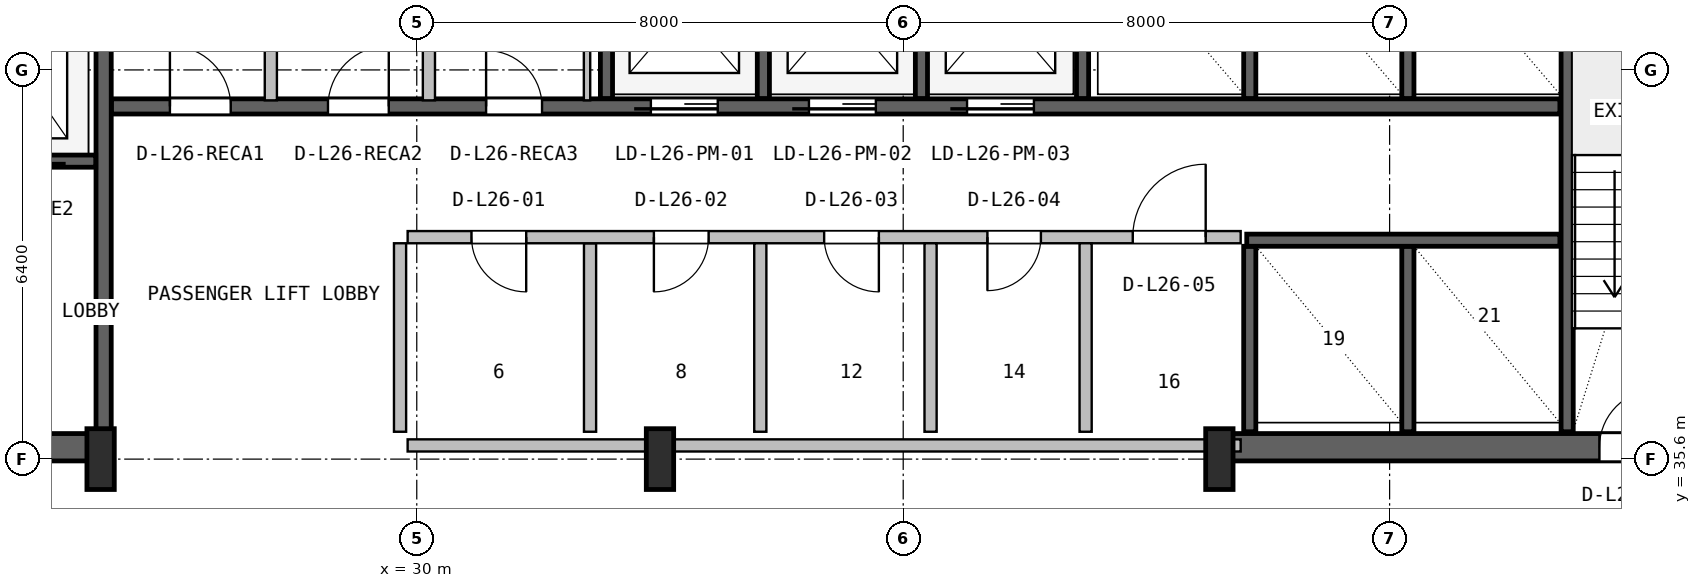
"""IFC4 building model, lengths in metres.
Left out: names, types, materials, properties, quantities, classifications, styles, units other than length and angle.
Written with IfcOpenShell. Run it as: python <this file> out.ifc"""

import sys

from ifc_helpers import new_model, si_unit, direction, frame, frame_2d, origin, origin_2d, place, context, subcontext, project, spatial, rectangle, i_section, extrude, source, transform, mapped, element, fill, save


model = new_model("IFC4")
c1 = context("Model", 3, precision=1e-05, world=origin(), true_north=direction((0.0, 1.0)))
c2 = subcontext(c1, "Body", "Model", "MODEL_VIEW")
j1 = project(units=[si_unit("LENGTHUNIT", "METRE"), si_unit("PLANEANGLEUNIT", "RADIAN")], contexts=[c1])
p1 = place(None, origin())
s1 = spatial("IfcSite", under=j1, at=p1, CompositionType="ELEMENT")
p2 = place(p1, origin())
s2 = spatial("IfcBuilding", under=s1, at=p2, CompositionType="ELEMENT")
p3 = place(p2, frame((0.0, 0.0, 110.6)))
s3 = spatial("IfcBuildingStorey", under=s2, at=p3, CompositionType="ELEMENT", Elevation=110.6)
p4 = place(p3, frame((15.57, 35.795, 0.0), z_axis=(0.0, 0.0, 1.0), x_axis=(1.0, 0.0, 0.0)))
e1 = element("IfcWall", 1, at=p4, inside=s3, PredefinedType="SHEAR", context=c2, shape_type="SweptSolid", body=[
    extrude(rectangle(XDim=9.23, YDim=0.45, at=frame_2d((4.615, 0.0))), origin(), (0.0, 0.0, 1.0), 3.55),
])
p5 = place(p4, frame((5.4, 0.0, 0.0)))
e2 = element("IfcOpeningElement", 2, at=p5, cuts=e1, PredefinedType="OPENING", context=c2, shape_type="SweptSolid", body=[
    extrude(rectangle(XDim=1.0, YDim=2.1, at=frame_2d((0.5, 1.05))), frame((0.0, 0.235, 0.0), z_axis=(0.0, -1.0, 0.0), x_axis=(1.0, 0.0, 0.0)), (0.0, 0.0, 1.0), 0.47),
])
p6 = place(p3, frame((43.2, 35.795, 0.0), z_axis=(0.0, 0.0, 1.0), x_axis=(1.0, 0.0, 0.0)))
e3 = element("IfcWall", 3, at=p6, inside=s3, PredefinedType="SHEAR", context=c2, shape_type="SweptSolid", body=[
    extrude(rectangle(XDim=9.23, YDim=0.45, at=frame_2d((4.615, 0.0))), origin(), (0.0, 0.0, 1.0), 3.55),
])
p7 = place(p6, frame((6.25, 0.0, 0.0)))
e4 = element("IfcOpeningElement", 4, at=p7, cuts=e3, PredefinedType="OPENING", context=c2, shape_type="SweptSolid", body=[
    extrude(rectangle(XDim=0.95, YDim=2.1, at=frame_2d((0.475, 1.05))), frame((0.0, 0.235, 0.0), z_axis=(0.0, -1.0, 0.0), x_axis=(1.0, 0.0, 0.0)), (0.0, 0.0, 1.0), 0.47),
])
m1 = source(origin(), c2, "Body", "SweptSolid", [
    extrude(i_section(OverallWidth=0.45, OverallDepth=1.0, WebThickness=0.016, FlangeThickness=0.03, FilletRadius=0.016, at=origin_2d()), origin(), (0.0, 0.0, 1.0), 3.8),
])
for number, where, z_axis, x_axis in (
    (5, (24.8, 35.6, 0.0), (0.0, 0.0, 1.0), (1.0, 0.0, 0.0)),
    (6, (34.0, 35.6, 0.0), (0.0, 0.0, 1.0), (1.0, 0.0, 0.0)),
    (7, (43.2, 35.6, 0.0), (0.0, 0.0, 1.0), (1.0, 0.0, 0.0)),
):
    element("IfcColumn", number, at=place(p3, frame(where, z_axis=z_axis, x_axis=x_axis)), inside=s3, PredefinedType="COLUMN", context=c2, shape_type="MappedRepresentation", body=[
        mapped(m1, transform((0.0, 0.0, 0.0), x_axis=(1.0, 0.0, 0.0), y_axis=(0.0, 1.0, 0.0), z_axis=(0.0, 0.0, 1.0), scale=1.0)),
    ])
p8 = place(p3, frame((24.85, 36.05, 0.0), z_axis=(0.0, 0.0, 1.0), x_axis=(0.0, 1.0, 0.0)))
e8 = element("IfcWall", 8, at=p8, inside=s3, PredefinedType="SHEAR", context=c2, shape_type="SweptSolid", body=[
    extrude(rectangle(XDim=10.45, YDim=0.25, at=frame_2d((5.225, 0.0))), origin(), (0.0, 0.0, 1.0), 3.55),
])
p9 = place(p3, frame((19.2, 40.5, 0.0), z_axis=(0.0, 0.0, 1.0), x_axis=(1.0, 0.0, 0.0)))
e9 = element("IfcWall", 9, at=p9, inside=s3, PredefinedType="SHEAR", context=c2, shape_type="SweptSolid", body=[
    extrude(rectangle(XDim=5.52, YDim=0.2, at=frame_2d((2.76, 0.0))), origin(), (0.0, 0.0, 1.0), 3.55),
])
p10 = place(p9, frame((1.05, 0.0, 0.0)))
e10 = element("IfcOpeningElement", 10, at=p10, cuts=e9, PredefinedType="OPENING", context=c2, shape_type="SweptSolid", body=[
    extrude(rectangle(XDim=1.1, YDim=2.18, at=frame_2d((0.55, 1.09))), frame((0.0, 0.11, 0.0), z_axis=(0.0, -1.0, 0.0), x_axis=(1.0, 0.0, 0.0)), (0.0, 0.0, 1.0), 0.22),
])
p11 = place(p9, frame((3.65, 0.0, 0.0)))
e11 = element("IfcOpeningElement", 11, at=p11, cuts=e9, PredefinedType="OPENING", context=c2, shape_type="SweptSolid", body=[
    extrude(rectangle(XDim=1.1, YDim=2.18, at=frame_2d((0.55, 1.09))), frame((0.0, 0.11, 0.0), z_axis=(0.0, -1.0, 0.0), x_axis=(1.0, 0.0, 0.0)), (0.0, 0.0, 1.0), 0.22),
])
p12 = place(p3, frame((48.92, 36.05, 0.0), z_axis=(0.0, 0.0, 1.0), x_axis=(0.0, 1.0, 0.0)))
e12 = element("IfcWall", 12, at=p12, inside=s3, PredefinedType="SHEAR", context=c2, shape_type="SweptSolid", body=[
    extrude(rectangle(XDim=10.5, YDim=0.2, at=frame_2d((5.25, 0.0))), origin(), (0.0, 0.0, 1.0), 3.55),
])
p13 = place(p3, frame((24.98, 41.4, 0.0), z_axis=(0.0, 0.0, 1.0), x_axis=(1.0, 0.0, 0.0)))
e13 = element("IfcWall", 13, at=p13, inside=s3, PredefinedType="SHEAR", context=c2, shape_type="SweptSolid", body=[
    extrude(rectangle(XDim=23.82, YDim=0.25, at=frame_2d((11.91, 0.0))), origin(), (0.0, 0.0, 1.0), 3.55),
])
p14 = place(p13, frame((8.87, 0.0, 0.0)))
e14 = element("IfcOpeningElement", 14, at=p14, cuts=e13, PredefinedType="OPENING", context=c2, shape_type="SweptSolid", body=[
    extrude(rectangle(XDim=1.1, YDim=2.18, at=frame_2d((0.55, 1.09))), frame((0.0, 0.135, 0.0), z_axis=(0.0, -1.0, 0.0), x_axis=(1.0, 0.0, 0.0)), (0.0, 0.0, 1.0), 0.27),
])
p15 = place(p13, frame((11.47, 0.0, 0.0)))
e15 = element("IfcOpeningElement", 15, at=p15, cuts=e13, PredefinedType="OPENING", context=c2, shape_type="SweptSolid", body=[
    extrude(rectangle(XDim=1.1, YDim=2.18, at=frame_2d((0.55, 1.09))), frame((0.0, 0.135, 0.0), z_axis=(0.0, -1.0, 0.0), x_axis=(1.0, 0.0, 0.0)), (0.0, 0.0, 1.0), 0.27),
])
p16 = place(p13, frame((14.07, 0.0, 0.0)))
e16 = element("IfcOpeningElement", 16, at=p16, cuts=e13, PredefinedType="OPENING", context=c2, shape_type="SweptSolid", body=[
    extrude(rectangle(XDim=1.1, YDim=2.18, at=frame_2d((0.55, 1.09))), frame((0.0, 0.135, 0.0), z_axis=(0.0, -1.0, 0.0), x_axis=(1.0, 0.0, 0.0)), (0.0, 0.0, 1.0), 0.27),
])
p17 = place(p13, frame((0.96, 0.0, 0.0)))
e17 = element("IfcOpeningElement", 17, at=p17, cuts=e13, PredefinedType="OPENING", context=c2, shape_type="SweptSolid", body=[
    extrude(rectangle(XDim=1.0, YDim=2.08, at=frame_2d((0.5, 1.04))), frame((0.0, 0.135, 0.0), z_axis=(0.0, -1.0, 0.0), x_axis=(1.0, 0.0, 0.0)), (0.0, 0.0, 1.0), 0.27),
])
p18 = place(p13, frame((3.56, 0.0, 0.0)))
e18 = element("IfcOpeningElement", 18, at=p18, cuts=e13, PredefinedType="OPENING", context=c2, shape_type="SweptSolid", body=[
    extrude(rectangle(XDim=1.0, YDim=2.08, at=frame_2d((0.5, 1.04))), frame((0.0, 0.135, 0.0), z_axis=(0.0, -1.0, 0.0), x_axis=(1.0, 0.0, 0.0)), (0.0, 0.0, 1.0), 0.27),
])
p19 = place(p13, frame((6.16, 0.0, 0.0)))
e19 = element("IfcOpeningElement", 19, at=p19, cuts=e13, PredefinedType="OPENING", context=c2, shape_type="SweptSolid", body=[
    extrude(rectangle(XDim=0.92, YDim=2.08, at=frame_2d((0.46, 1.04))), frame((0.0, 0.135, 0.0), z_axis=(0.0, -1.0, 0.0), x_axis=(1.0, 0.0, 0.0)), (0.0, 0.0, 1.0), 0.27),
])
p20 = place(p3, frame((33.12, 41.53, 0.0), z_axis=(0.0, 0.0, 1.0), x_axis=(0.0, 1.0, 0.0)))
e20 = element("IfcWall", 20, at=p20, inside=s3, PredefinedType="SHEAR", context=c2, shape_type="SweptSolid", body=[
    extrude(rectangle(XDim=5.02, YDim=0.2, at=frame_2d((2.51, 0.0))), origin(), (0.0, 0.0, 1.0), 3.55),
])
for number, where, z_axis, x_axis in (
    (21, (35.7, 41.53, 0.0), (0.0, 0.0, 1.0), (0.0, 1.0, 0.0)),
    (22, (38.3, 41.53, 0.0), (0.0, 0.0, 1.0), (0.0, 1.0, 0.0)),
):
    element("IfcWall", number, at=place(p3, frame(where, z_axis=z_axis, x_axis=x_axis)), inside=s3, PredefinedType="SHEAR", context=c2, shape_type="SweptSolid", body=[
        extrude(rectangle(XDim=2.87, YDim=0.2, at=frame_2d((1.435, 0.0))), origin(), (0.0, 0.0, 1.0), 3.55),
    ])
p21 = place(p3, frame((40.95, 41.53, 0.0), z_axis=(0.0, 0.0, 1.0), x_axis=(0.0, 1.0, 0.0)))
e23 = element("IfcWall", 23, at=p21, inside=s3, PredefinedType="SHEAR", context=c2, shape_type="SweptSolid", body=[
    extrude(rectangle(XDim=5.02, YDim=0.2, at=frame_2d((2.51, 0.0))), origin(), (0.0, 0.0, 1.0), 3.55),
])
for number, where, z_axis, x_axis in (
    (24, (43.7, 41.53, 0.0), (0.0, 0.0, 1.0), (0.0, 1.0, 0.0)),
    (25, (46.3, 41.53, 0.0), (0.0, 0.0, 1.0), (0.0, 1.0, 0.0)),
):
    element("IfcWall", number, at=place(p3, frame(where, z_axis=z_axis, x_axis=x_axis)), inside=s3, PredefinedType="SHEAR", context=c2, shape_type="SweptSolid", body=[
        extrude(rectangle(XDim=2.87, YDim=0.2, at=frame_2d((1.435, 0.0))), origin(), (0.0, 0.0, 1.0), 3.55),
    ])
for number, where, z_axis, x_axis in (
    (26, (43.7, 36.05, 0.0), (0.0, 0.0, 1.0), (0.0, 1.0, 0.0)),
    (27, (46.3, 36.05, 0.0), (0.0, 0.0, 1.0), (0.0, 1.0, 0.0)),
):
    element("IfcWall", number, at=place(p3, frame(where, z_axis=z_axis, x_axis=x_axis)), inside=s3, PredefinedType="SHEAR", context=c2, shape_type="SweptSolid", body=[
        extrude(rectangle(XDim=3.05, YDim=0.2, at=frame_2d((1.525, 0.0))), origin(), (0.0, 0.0, 1.0), 3.55),
    ])
p22 = place(p3, frame((43.65, 39.2, 0.0), z_axis=(0.0, 0.0, 1.0), x_axis=(1.0, 0.0, 0.0)))
e28 = element("IfcWall", 28, at=p22, inside=s3, PredefinedType="SHEAR", context=c2, shape_type="SweptSolid", body=[
    extrude(rectangle(XDim=5.15, YDim=0.2, at=frame_2d((2.575, 0.0))), origin(), (0.0, 0.0, 1.0), 3.55),
])
p23 = place(p3, frame((29.85, 35.825, 0.0), z_axis=(0.0, 0.0, 1.0), x_axis=(1.0, 0.0, 0.0)))
e29 = element("IfcWall", 29, at=p23, inside=s3, PredefinedType="SOLIDWALL", context=c2, shape_type="SweptSolid", body=[
    extrude(rectangle(XDim=13.7, YDim=0.2, at=frame_2d((6.85, 0.0))), origin(), (0.0, 0.0, 1.0), 2.325),
])
p24 = place(p3, frame((32.85, 36.05, 0.0), z_axis=(0.0, 0.0, 1.0), x_axis=(0.0, 1.0, 0.0)))
e30 = element("IfcWall", 30, at=p24, inside=s3, PredefinedType="PLUMBINGWALL", context=c2, shape_type="SweptSolid", body=[
    extrude(rectangle(XDim=3.1, YDim=0.2, at=frame_2d((1.55, 0.0))), origin(), (0.0, 0.0, 1.0), 3.53),
])
p25 = place(p3, frame((29.85, 39.25, 0.0), z_axis=(0.0, 0.0, 1.0), x_axis=(1.0, 0.0, 0.0)))
e31 = element("IfcWall", 31, at=p25, inside=s3, PredefinedType="SOLIDWALL", context=c2, shape_type="SweptSolid", body=[
    extrude(rectangle(XDim=13.7, YDim=0.2, at=frame_2d((6.85, 0.0))), origin(), (0.0, 0.0, 1.0), 3.53),
])
p26 = place(p25, frame((1.05, 0.0, 0.0)))
e32 = element("IfcOpeningElement", 32, at=p26, cuts=e31, PredefinedType="OPENING", context=c2, shape_type="SweptSolid", body=[
    extrude(rectangle(XDim=0.9, YDim=2.06, at=frame_2d((0.45, 1.03))), frame((0.0, 0.11, 0.0), z_axis=(0.0, -1.0, 0.0), x_axis=(1.0, 0.0, 0.0)), (0.0, 0.0, 1.0), 0.22),
])
p27 = place(p25, frame((4.05, 0.0, 0.0)))
e33 = element("IfcOpeningElement", 33, at=p27, cuts=e31, PredefinedType="OPENING", context=c2, shape_type="SweptSolid", body=[
    extrude(rectangle(XDim=0.9, YDim=2.06, at=frame_2d((0.45, 1.03))), frame((0.0, 0.11, 0.0), z_axis=(0.0, -1.0, 0.0), x_axis=(1.0, 0.0, 0.0)), (0.0, 0.0, 1.0), 0.22),
])
p28 = place(p25, frame((6.85, 0.0, 0.0)))
e34 = element("IfcOpeningElement", 34, at=p28, cuts=e31, PredefinedType="OPENING", context=c2, shape_type="SweptSolid", body=[
    extrude(rectangle(XDim=0.9, YDim=2.06, at=frame_2d((0.45, 1.03))), frame((0.0, 0.11, 0.0), z_axis=(0.0, -1.0, 0.0), x_axis=(1.0, 0.0, 0.0)), (0.0, 0.0, 1.0), 0.22),
])
p29 = place(p25, frame((9.535, 0.0, 0.0)))
e35 = element("IfcOpeningElement", 35, at=p29, cuts=e31, PredefinedType="OPENING", context=c2, shape_type="SweptSolid", body=[
    extrude(rectangle(XDim=0.88, YDim=2.06, at=frame_2d((0.44, 1.03))), frame((0.0, 0.11, 0.0), z_axis=(0.0, -1.0, 0.0), x_axis=(1.0, 0.0, 0.0)), (0.0, 0.0, 1.0), 0.22),
])
p30 = place(p25, frame((11.925, 0.0, 0.0)))
e36 = element("IfcOpeningElement", 36, at=p30, cuts=e31, PredefinedType="OPENING", context=c2, shape_type="SweptSolid", body=[
    extrude(rectangle(XDim=1.2, YDim=2.1, at=frame_2d((0.6, 1.05))), frame((0.0, 0.11, 0.0), z_axis=(0.0, -1.0, 0.0), x_axis=(1.0, 0.0, 0.0)), (0.0, 0.0, 1.0), 0.22),
])
for number, where, z_axis, x_axis in (
    (37, (29.725, 36.05, 0.0), (0.0, 0.0, 1.0), (0.0, 1.0, 0.0)),
    (38, (35.65, 36.05, 0.0), (0.0, 0.0, 1.0), (0.0, 1.0, 0.0)),
    (39, (38.45, 36.05, 0.0), (0.0, 0.0, 1.0), (0.0, 1.0, 0.0)),
):
    element("IfcWall", number, at=place(p3, frame(where, z_axis=z_axis, x_axis=x_axis)), inside=s3, PredefinedType="PLUMBINGWALL", context=c2, shape_type="SweptSolid", body=[
        extrude(rectangle(XDim=3.1, YDim=0.2, at=frame_2d((1.55, 0.0))), origin(), (0.0, 0.0, 1.0), 3.53),
    ])
p31 = place(p3, frame((41.0, 36.05, 0.0), z_axis=(0.0, 0.0, 1.0), x_axis=(0.0, 1.0, 0.0)))
e40 = element("IfcWall", 40, at=p31, inside=s3, PredefinedType="SOLIDWALL", context=c2, shape_type="SweptSolid", body=[
    extrude(rectangle(XDim=3.1, YDim=0.2, at=frame_2d((1.55, 0.0))), origin(), (0.0, 0.0, 1.0), 3.53),
])
for number, where, z_axis, x_axis in (
    (41, (27.6, 41.5, 0.0), (0.0, 0.0, 1.0), (0.0, 1.0, 0.0)),
    (42, (30.2, 41.5, 0.0), (0.0, 0.0, 1.0), (0.0, 1.0, 0.0)),
):
    element("IfcWall", number, at=place(p3, frame(where, z_axis=z_axis, x_axis=x_axis)), inside=s3, PredefinedType="SOLIDWALL", context=c2, shape_type="SweptSolid", body=[
        extrude(rectangle(XDim=5.02, YDim=0.2, at=frame_2d((2.51, 0.0))), origin(), (0.0, 0.0, 1.0), 3.53),
    ])
p32 = place(p3, frame((32.8, 41.5, 0.0), z_axis=(0.0, 0.0, 1.0), x_axis=(0.0, 1.0, 0.0)))
e43 = element("IfcWall", 43, at=p32, inside=s3, PredefinedType="PARTITIONING", context=c2, shape_type="SweptSolid", body=[
    extrude(rectangle(XDim=5.02, YDim=0.105, at=frame_2d((2.51, 0.0))), origin(), (0.0, 0.0, 1.0), 3.53),
])
m2 = source(origin(), c2, "Body", "SweptSolid", [
    extrude(rectangle(XDim=0.95, YDim=2.1, at=frame_2d((0.475, 1.05))), frame((0.0, 0.025, 0.0), z_axis=(0.0, -1.0, 0.0), x_axis=(1.0, 0.0, 0.0)), (0.0, 0.0, 1.0), 0.05),
])
p33 = place(p7, origin())
e44 = element("IfcDoor", 44, at=p33, inside=s3, OperationType="SINGLE_SWING_RIGHT", PredefinedType="DOOR", context=c2, shape_type="MappedRepresentation", body=[
    mapped(m2, transform((0.0, 0.0, 0.0), x_axis=(1.0, 0.0, 0.0), y_axis=(0.0, 1.0, 0.0), z_axis=(0.0, 0.0, 1.0), scale=1.0)),
])
fill(e4, e44)
m3 = source(origin(), c2, "Body", "SweptSolid", [
    extrude(rectangle(XDim=1.1, YDim=2.18, at=frame_2d((0.55, 1.09))), frame((0.0, 0.025, 0.0), z_axis=(0.0, -1.0, 0.0), x_axis=(1.0, 0.0, 0.0)), (0.0, 0.0, 1.0), 0.05),
])
p34 = place(p14, frame((1.1, 0.0, 0.0), z_axis=(0.0, 0.0, 1.0), x_axis=(-1.0, 0.0, 0.0)))
e45 = element("IfcDoor", 45, at=p34, inside=s3, OperationType="SLIDING_TO_LEFT", PredefinedType="DOOR", context=c2, shape_type="MappedRepresentation", body=[
    mapped(m3, transform((0.0, 0.0, 0.0), x_axis=(1.0, 0.0, 0.0), y_axis=(0.0, 1.0, 0.0), z_axis=(0.0, 0.0, 1.0), scale=1.0)),
])
fill(e14, e45)
p35 = place(p15, frame((1.1, 0.0, 0.0), z_axis=(0.0, 0.0, 1.0), x_axis=(-1.0, 0.0, 0.0)))
e46 = element("IfcDoor", 46, at=p35, inside=s3, OperationType="SLIDING_TO_LEFT", PredefinedType="DOOR", context=c2, shape_type="MappedRepresentation", body=[
    mapped(m3, transform((0.0, 0.0, 0.0), x_axis=(1.0, 0.0, 0.0), y_axis=(0.0, 1.0, 0.0), z_axis=(0.0, 0.0, 1.0), scale=1.0)),
])
fill(e15, e46)
p36 = place(p16, frame((1.1, 0.0, 0.0), z_axis=(0.0, 0.0, 1.0), x_axis=(-1.0, 0.0, 0.0)))
e47 = element("IfcDoor", 47, at=p36, inside=s3, OperationType="SLIDING_TO_LEFT", PredefinedType="DOOR", context=c2, shape_type="MappedRepresentation", body=[
    mapped(m3, transform((0.0, 0.0, 0.0), x_axis=(1.0, 0.0, 0.0), y_axis=(0.0, 1.0, 0.0), z_axis=(0.0, 0.0, 1.0), scale=1.0)),
])
fill(e16, e47)
m4 = source(origin(), c2, "Body", "SweptSolid", [
    extrude(rectangle(XDim=1.0, YDim=2.08, at=frame_2d((0.5, 1.04))), frame((0.0, 0.025, 0.0), z_axis=(0.0, -1.0, 0.0), x_axis=(1.0, 0.0, 0.0)), (0.0, 0.0, 1.0), 0.05),
])
p37 = place(p17, origin())
e48 = element("IfcDoor", 48, at=p37, inside=s3, OperationType="SINGLE_SWING_LEFT", PredefinedType="DOOR", context=c2, shape_type="MappedRepresentation", body=[
    mapped(m4, transform((0.0, 0.0, 0.0), x_axis=(1.0, 0.0, 0.0), y_axis=(0.0, 1.0, 0.0), z_axis=(0.0, 0.0, 1.0), scale=1.0)),
])
fill(e17, e48)
p38 = place(p18, origin())
e49 = element("IfcDoor", 49, at=p38, inside=s3, OperationType="SINGLE_SWING_RIGHT", PredefinedType="DOOR", context=c2, shape_type="MappedRepresentation", body=[
    mapped(m4, transform((0.0, 0.0, 0.0), x_axis=(1.0, 0.0, 0.0), y_axis=(0.0, 1.0, 0.0), z_axis=(0.0, 0.0, 1.0), scale=1.0)),
])
fill(e18, e49)
m5 = source(origin(), c2, "Body", "SweptSolid", [
    extrude(rectangle(XDim=0.92, YDim=2.08, at=frame_2d((0.46, 1.04))), frame((0.0, 0.025, 0.0), z_axis=(0.0, -1.0, 0.0), x_axis=(1.0, 0.0, 0.0)), (0.0, 0.0, 1.0), 0.05),
])
p39 = place(p19, origin())
e50 = element("IfcDoor", 50, at=p39, inside=s3, OperationType="SINGLE_SWING_LEFT", PredefinedType="DOOR", context=c2, shape_type="MappedRepresentation", body=[
    mapped(m5, transform((0.0, 0.0, 0.0), x_axis=(1.0, 0.0, 0.0), y_axis=(0.0, 1.0, 0.0), z_axis=(0.0, 0.0, 1.0), scale=1.0)),
])
fill(e19, e50)
m6 = source(origin(), c2, "Body", "SweptSolid", [
    extrude(rectangle(XDim=0.9, YDim=2.06, at=frame_2d((0.45, 1.03))), frame((0.0, 0.025, 0.0), z_axis=(0.0, -1.0, 0.0), x_axis=(1.0, 0.0, 0.0)), (0.0, 0.0, 1.0), 0.05),
])
p40 = place(p26, frame((0.9, 0.0, 0.0), z_axis=(0.0, 0.0, 1.0), x_axis=(-1.0, 0.0, 0.0)))
e51 = element("IfcDoor", 51, at=p40, inside=s3, OperationType="SINGLE_SWING_RIGHT", PredefinedType="DOOR", context=c2, shape_type="MappedRepresentation", body=[
    mapped(m6, transform((0.0, 0.0, 0.0), x_axis=(1.0, 0.0, 0.0), y_axis=(0.0, 1.0, 0.0), z_axis=(0.0, 0.0, 1.0), scale=1.0)),
])
fill(e32, e51)
p41 = place(p27, frame((0.9, 0.0, 0.0), z_axis=(0.0, 0.0, 1.0), x_axis=(-1.0, 0.0, 0.0)))
e52 = element("IfcDoor", 52, at=p41, inside=s3, OperationType="SINGLE_SWING_LEFT", PredefinedType="DOOR", context=c2, shape_type="MappedRepresentation", body=[
    mapped(m6, transform((0.0, 0.0, 0.0), x_axis=(1.0, 0.0, 0.0), y_axis=(0.0, 1.0, 0.0), z_axis=(0.0, 0.0, 1.0), scale=1.0)),
])
fill(e33, e52)
p42 = place(p28, frame((0.9, 0.0, 0.0), z_axis=(0.0, 0.0, 1.0), x_axis=(-1.0, 0.0, 0.0)))
e53 = element("IfcDoor", 53, at=p42, inside=s3, OperationType="SINGLE_SWING_RIGHT", PredefinedType="DOOR", context=c2, shape_type="MappedRepresentation", body=[
    mapped(m6, transform((0.0, 0.0, 0.0), x_axis=(1.0, 0.0, 0.0), y_axis=(0.0, 1.0, 0.0), z_axis=(0.0, 0.0, 1.0), scale=1.0)),
])
fill(e34, e53)
m7 = source(origin(), c2, "Body", "SweptSolid", [
    extrude(rectangle(XDim=0.88, YDim=2.06, at=frame_2d((0.44, 1.03))), frame((0.0, 0.025, 0.0), z_axis=(0.0, -1.0, 0.0), x_axis=(1.0, 0.0, 0.0)), (0.0, 0.0, 1.0), 0.05),
])
p43 = place(p29, frame((0.88, 0.0, 0.0), z_axis=(0.0, 0.0, 1.0), x_axis=(-1.0, 0.0, 0.0)))
e54 = element("IfcDoor", 54, at=p43, inside=s3, OperationType="SINGLE_SWING_LEFT", PredefinedType="DOOR", context=c2, shape_type="MappedRepresentation", body=[
    mapped(m7, transform((0.0, 0.0, 0.0), x_axis=(1.0, 0.0, 0.0), y_axis=(0.0, 1.0, 0.0), z_axis=(0.0, 0.0, 1.0), scale=1.0)),
])
fill(e35, e54)
m8 = source(origin(), c2, "Body", "SweptSolid", [
    extrude(rectangle(XDim=1.2, YDim=2.1, at=frame_2d((0.6, 1.05))), frame((0.0, 0.025, 0.0), z_axis=(0.0, -1.0, 0.0), x_axis=(1.0, 0.0, 0.0)), (0.0, 0.0, 1.0), 0.05),
])
p44 = place(p30, origin())
e55 = element("IfcDoor", 55, at=p44, inside=s3, OperationType="SINGLE_SWING_RIGHT", PredefinedType="DOOR", context=c2, shape_type="MappedRepresentation", body=[
    mapped(m8, transform((0.0, 0.0, 0.0), x_axis=(1.0, 0.0, 0.0), y_axis=(0.0, 1.0, 0.0), z_axis=(0.0, 0.0, 1.0), scale=1.0)),
])
fill(e36, e55)
save(model, sys.argv[1])
